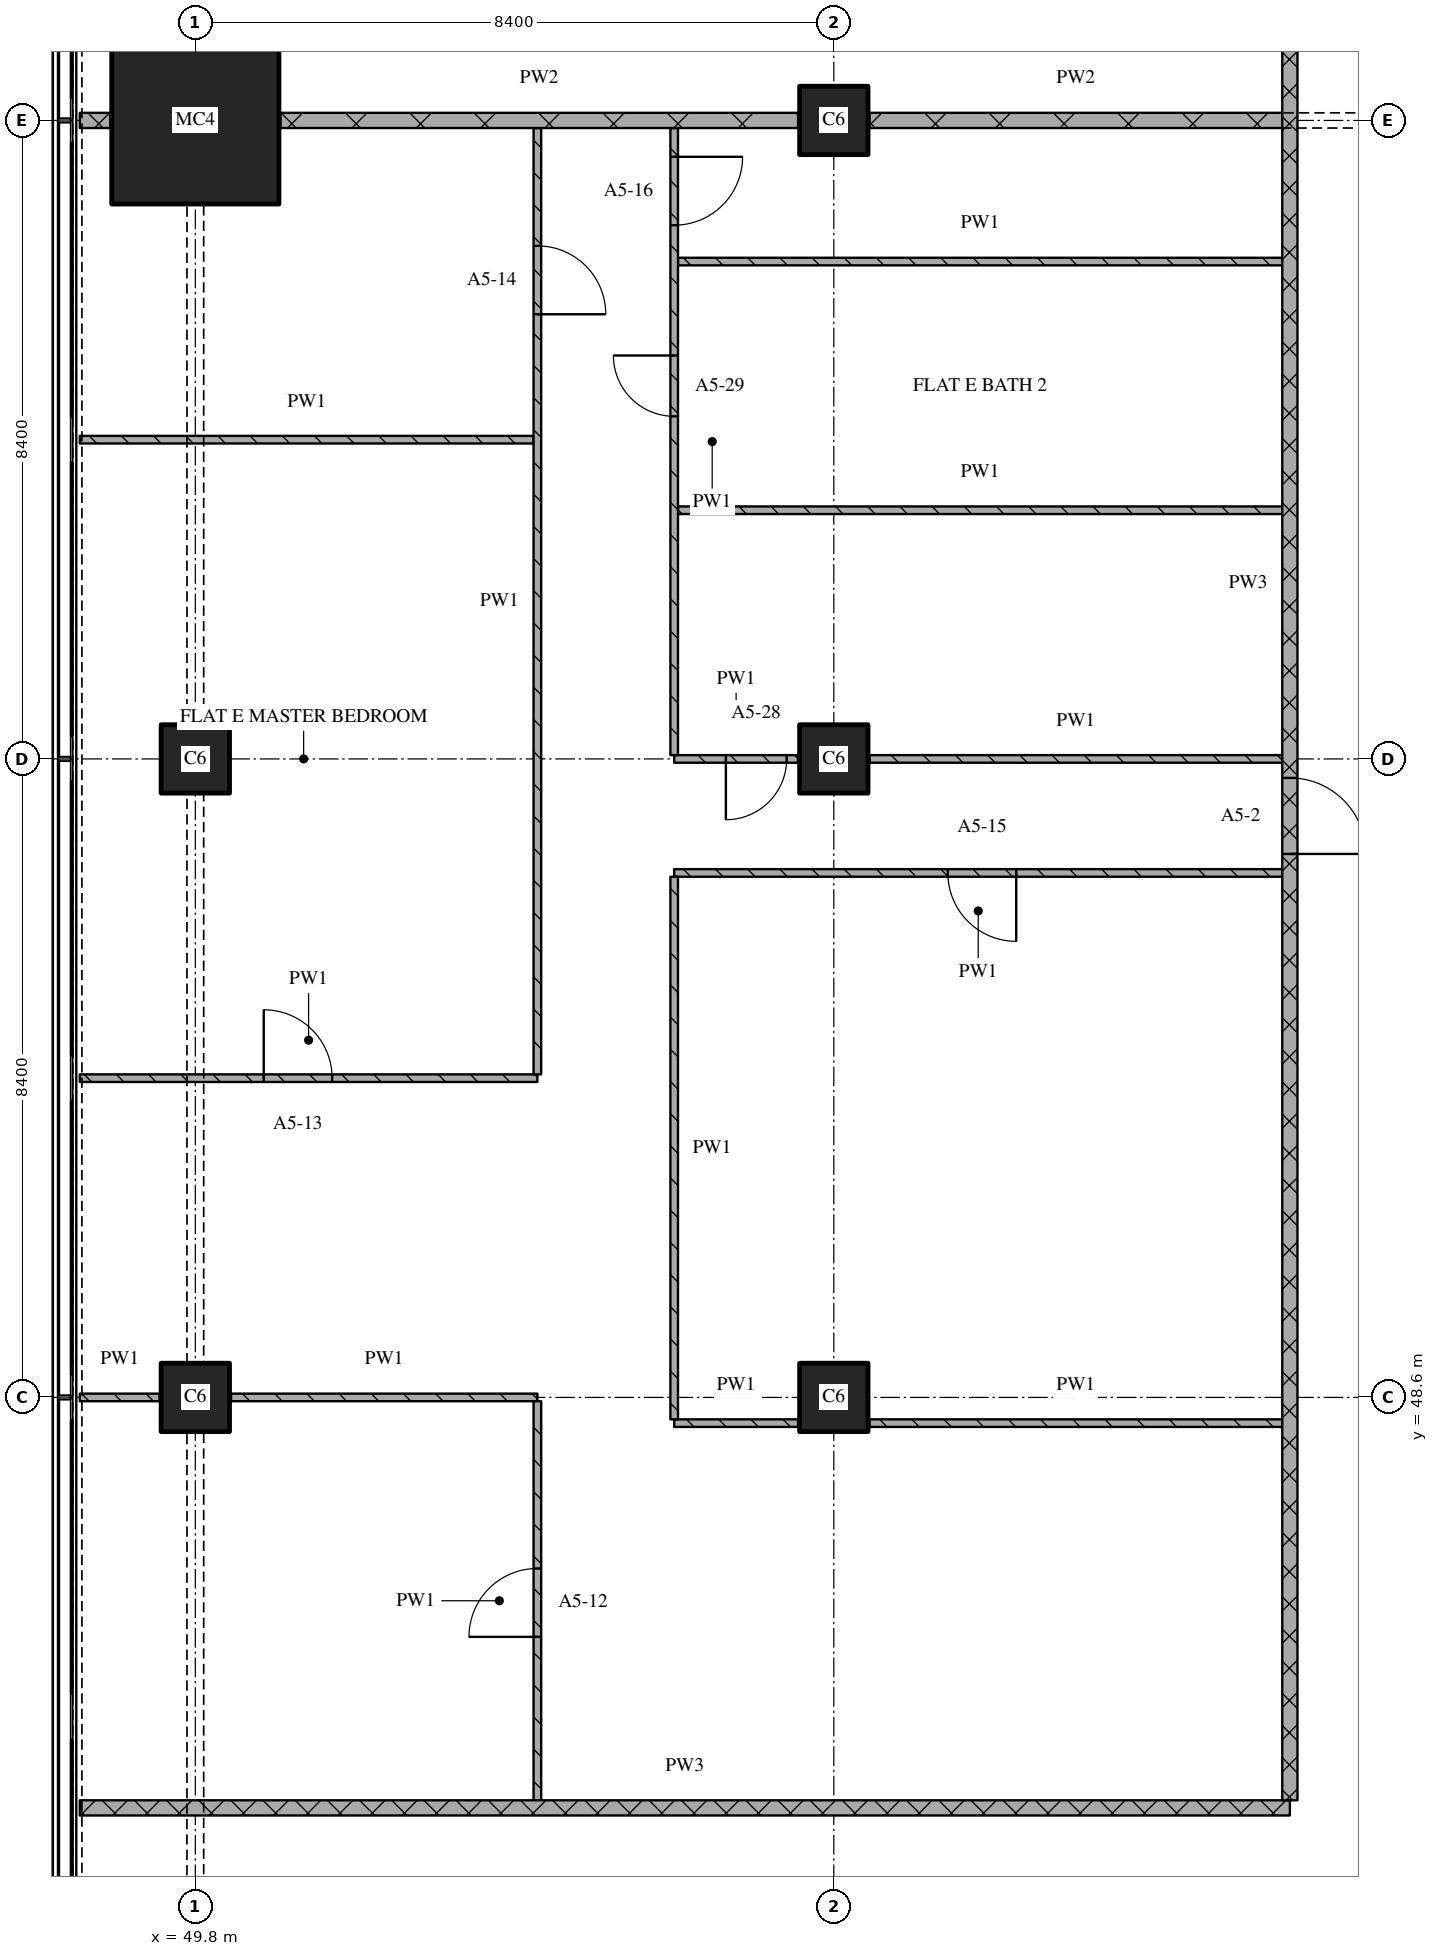
"""IFC4 building model, lengths in metres.
Left out: names, types, materials, properties, quantities, classifications, styles, units other than length and angle.
Written with IfcOpenShell. Run it as: python <this file> out.ifc"""

import sys

from ifc_helpers import new_model, si_unit, direction, frame, frame_2d, origin, origin_2d, place, context, subcontext, project, spatial, rectangle, extrude, element, fill, save


model = new_model("IFC4")
c1 = context("Model", 3, precision=1e-05, world=origin(), true_north=direction((0.0, 1.0)))
c2 = subcontext(c1, "Body", "Model", "MODEL_VIEW")
j1 = project(units=[si_unit("LENGTHUNIT", "METRE"), si_unit("PLANEANGLEUNIT", "RADIAN")], contexts=[c1])
p1 = place(None, origin())
s1 = spatial("IfcSite", under=j1, at=p1, CompositionType="ELEMENT")
p2 = place(p1, origin())
s2 = spatial("IfcBuilding", under=s1, at=p2, CompositionType="ELEMENT")
p3 = place(p2, frame((0.0, 0.0, 80.4)))
s3 = spatial("IfcBuildingStorey", under=s2, at=p3, CompositionType="ELEMENT", Elevation=80.4)
for number, where, z_axis, x_axis in (
    (1, (49.8, 48.6, 0.0), (0.0, 0.0, 1.0), (1.0, 0.0, 0.0)),
    (2, (49.8, 57.0, 0.0), (0.0, 0.0, 1.0), (1.0, 0.0, 0.0)),
):
    element("IfcColumn", number, at=place(p3, frame(where, z_axis=z_axis, x_axis=x_axis)), inside=s3, PredefinedType="COLUMN", context=c2, shape_type="SweptSolid", body=[
        extrude(rectangle(XDim=0.9, YDim=0.9, at=origin_2d()), origin(), (0.0, 0.0, 1.0), 3.6),
    ])
p4 = place(p3, frame((49.8, 65.4, 0.0), z_axis=(0.0, 0.0, 1.0), x_axis=(1.0, 0.0, 0.0)))
e3 = element("IfcColumn", 3, at=p4, inside=s3, PredefinedType="COLUMN", context=c2, shape_type="SweptSolid", body=[
    extrude(rectangle(XDim=2.2, YDim=2.2, at=origin_2d()), origin(), (0.0, 0.0, 1.0), 3.6),
])
for number, where, z_axis, x_axis in (
    (4, (58.2, 48.6, 0.0), (0.0, 0.0, 1.0), (1.0, 0.0, 0.0)),
    (5, (58.2, 57.0, 0.0), (0.0, 0.0, 1.0), (1.0, 0.0, 0.0)),
    (6, (58.2, 65.4, 0.0), (0.0, 0.0, 1.0), (1.0, 0.0, 0.0)),
):
    element("IfcColumn", number, at=place(p3, frame(where, z_axis=z_axis, x_axis=x_axis)), inside=s3, PredefinedType="COLUMN", context=c2, shape_type="SweptSolid", body=[
        extrude(rectangle(XDim=0.9, YDim=0.9, at=origin_2d()), origin(), (0.0, 0.0, 1.0), 3.6),
    ])
p5 = place(p3, frame((48.28, 43.2, 0.0), z_axis=(0.0, 0.0, 1.0), x_axis=(1.0, 0.0, 0.0)))
e7 = element("IfcWall", 7, at=p5, inside=s3, PredefinedType="PARTITIONING", context=c2, shape_type="SweptSolid", body=[
    extrude(rectangle(XDim=15.92, YDim=0.2, at=frame_2d((7.96, 0.0))), origin(), (0.0, 0.0, 1.0), 3.3),
])
p6 = place(p3, frame((56.1, 48.262, 0.0), z_axis=(0.0, 0.0, 1.0), x_axis=(1.0, 0.0, 0.0)))
e8 = element("IfcWall", 8, at=p6, inside=s3, PredefinedType="PARTITIONING", context=c2, shape_type="SweptSolid", body=[
    extrude(rectangle(XDim=1.63, YDim=0.1, at=frame_2d((0.815, 0.0))), origin(), (0.0, 0.0, 1.0), 3.3),
])
p7 = place(p3, frame((58.67, 48.262, 0.0), z_axis=(0.0, 0.0, 1.0), x_axis=(1.0, 0.0, 0.0)))
e9 = element("IfcWall", 9, at=p7, inside=s3, PredefinedType="PARTITIONING", context=c2, shape_type="SweptSolid", body=[
    extrude(rectangle(XDim=5.43, YDim=0.1, at=frame_2d((2.715, 0.0))), origin(), (0.0, 0.0, 1.0), 3.3),
])
p8 = place(p3, frame((48.28, 48.6, 0.0), z_axis=(0.0, 0.0, 1.0), x_axis=(1.0, 0.0, 0.0)))
e10 = element("IfcWall", 10, at=p8, inside=s3, PredefinedType="PARTITIONING", context=c2, shape_type="SweptSolid", body=[
    extrude(rectangle(XDim=1.05, YDim=0.1, at=frame_2d((0.525, 0.0))), origin(), (0.0, 0.0, 1.0), 3.3),
])
p9 = place(p3, frame((50.27, 48.6, 0.0), z_axis=(0.0, 0.0, 1.0), x_axis=(1.0, 0.0, 0.0)))
e11 = element("IfcWall", 11, at=p9, inside=s3, PredefinedType="PARTITIONING", context=c2, shape_type="SweptSolid", body=[
    extrude(rectangle(XDim=4.03, YDim=0.1, at=frame_2d((2.015, 0.0))), origin(), (0.0, 0.0, 1.0), 3.3),
])
p10 = place(p3, frame((48.28, 52.8, 0.0), z_axis=(0.0, 0.0, 1.0), x_axis=(1.0, 0.0, 0.0)))
e12 = element("IfcWall", 12, at=p10, inside=s3, PredefinedType="PARTITIONING", context=c2, shape_type="SweptSolid", body=[
    extrude(rectangle(XDim=6.02, YDim=0.1, at=frame_2d((3.01, 0.0))), origin(), (0.0, 0.0, 1.0), 3.3),
])
p11 = place(p10, frame((2.42, 0.0, 0.0)))
e13 = element("IfcOpeningElement", 13, at=p11, cuts=e12, PredefinedType="OPENING", context=c2, shape_type="SweptSolid", body=[
    extrude(rectangle(XDim=0.9, YDim=2.1, at=frame_2d((0.45, 1.05))), frame((0.0, 0.06, 0.0), z_axis=(0.0, -1.0, 0.0), x_axis=(1.0, 0.0, 0.0)), (0.0, 0.0, 1.0), 0.12),
])
p12 = place(p3, frame((64.1, 55.5, 0.0), z_axis=(0.0, 0.0, 1.0), x_axis=(-1.0, 0.0, 0.0)))
e14 = element("IfcWall", 14, at=p12, inside=s3, PredefinedType="PARTITIONING", context=c2, shape_type="SweptSolid", body=[
    extrude(rectangle(XDim=8.0, YDim=0.1, at=frame_2d((4.0, 0.0))), origin(), (0.0, 0.0, 1.0), 3.3),
])
p13 = place(p12, frame((3.5, 0.0, 0.0)))
e15 = element("IfcOpeningElement", 15, at=p13, cuts=e14, PredefinedType="OPENING", context=c2, shape_type="SweptSolid", body=[
    extrude(rectangle(XDim=0.9, YDim=2.1, at=frame_2d((0.45, 1.05))), frame((0.0, 0.06, 0.0), z_axis=(0.0, -1.0, 0.0), x_axis=(1.0, 0.0, 0.0)), (0.0, 0.0, 1.0), 0.12),
])
p14 = place(p3, frame((56.1, 57.0, 0.0), z_axis=(0.0, 0.0, 1.0), x_axis=(1.0, 0.0, 0.0)))
e16 = element("IfcWall", 16, at=p14, inside=s3, PredefinedType="PARTITIONING", context=c2, shape_type="SweptSolid", body=[
    extrude(rectangle(XDim=1.63, YDim=0.1, at=frame_2d((0.815, 0.0))), origin(), (0.0, 0.0, 1.0), 3.3),
])
p15 = place(p14, frame((0.68, 0.0, 0.0)))
e17 = element("IfcOpeningElement", 17, at=p15, cuts=e16, PredefinedType="OPENING", context=c2, shape_type="SweptSolid", body=[
    extrude(rectangle(XDim=0.8, YDim=2.1, at=frame_2d((0.4, 1.05))), frame((0.0, 0.06, 0.0), z_axis=(0.0, -1.0, 0.0), x_axis=(1.0, 0.0, 0.0)), (0.0, 0.0, 1.0), 0.12),
])
p16 = place(p3, frame((58.67, 57.0, 0.0), z_axis=(0.0, 0.0, 1.0), x_axis=(1.0, 0.0, 0.0)))
e18 = element("IfcWall", 18, at=p16, inside=s3, PredefinedType="PARTITIONING", context=c2, shape_type="SweptSolid", body=[
    extrude(rectangle(XDim=5.43, YDim=0.1, at=frame_2d((2.715, 0.0))), origin(), (0.0, 0.0, 1.0), 3.3),
])
p17 = place(p3, frame((56.15, 60.271, 0.0), z_axis=(0.0, 0.0, 1.0), x_axis=(1.0, 0.0, 0.0)))
e19 = element("IfcWall", 19, at=p17, inside=s3, PredefinedType="PARTITIONING", context=c2, shape_type="SweptSolid", body=[
    extrude(rectangle(XDim=7.95, YDim=0.1, at=frame_2d((3.975, 0.0))), origin(), (0.0, 0.0, 1.0), 3.3),
])
p18 = place(p3, frame((48.28, 61.2, 0.0), z_axis=(0.0, 0.0, 1.0), x_axis=(1.0, 0.0, 0.0)))
e20 = element("IfcWall", 20, at=p18, inside=s3, PredefinedType="PARTITIONING", context=c2, shape_type="SweptSolid", body=[
    extrude(rectangle(XDim=5.97, YDim=0.1, at=frame_2d((2.985, 0.0))), origin(), (0.0, 0.0, 1.0), 3.3),
])
p19 = place(p3, frame((56.15, 63.543, 0.0), z_axis=(0.0, 0.0, 1.0), x_axis=(1.0, 0.0, 0.0)))
e21 = element("IfcWall", 21, at=p19, inside=s3, PredefinedType="PARTITIONING", context=c2, shape_type="SweptSolid", body=[
    extrude(rectangle(XDim=7.95, YDim=0.1, at=frame_2d((3.975, 0.0))), origin(), (0.0, 0.0, 1.0), 3.3),
])
p20 = place(p3, frame((48.28, 65.4, 0.0), z_axis=(0.0, 0.0, 1.0), x_axis=(1.0, 0.0, 0.0)))
e22 = element("IfcWall", 22, at=p20, inside=s3, PredefinedType="PARTITIONING", context=c2, shape_type="SweptSolid", body=[
    extrude(rectangle(XDim=0.4, YDim=0.2, at=frame_2d((0.2, 0.0))), origin(), (0.0, 0.0, 1.0), 3.3),
])
p21 = place(p3, frame((50.92, 65.4, 0.0), z_axis=(0.0, 0.0, 1.0), x_axis=(1.0, 0.0, 0.0)))
e23 = element("IfcWall", 23, at=p21, inside=s3, PredefinedType="PARTITIONING", context=c2, shape_type="SweptSolid", body=[
    extrude(rectangle(XDim=6.81, YDim=0.2, at=frame_2d((3.405, 0.0))), origin(), (0.0, 0.0, 1.0), 2.41),
])
p22 = place(p3, frame((58.67, 65.4, 0.0), z_axis=(0.0, 0.0, 1.0), x_axis=(1.0, 0.0, 0.0)))
e24 = element("IfcWall", 24, at=p22, inside=s3, PredefinedType="PARTITIONING", context=c2, shape_type="SweptSolid", body=[
    extrude(rectangle(XDim=5.43, YDim=0.2, at=frame_2d((2.715, 0.0))), origin(), (0.0, 0.0, 1.0), 2.8),
])
p23 = place(p3, frame((54.3, 43.3, 0.0), z_axis=(0.0, 0.0, 1.0), x_axis=(0.0, 1.0, 0.0)))
e25 = element("IfcWall", 25, at=p23, inside=s3, PredefinedType="PARTITIONING", context=c2, shape_type="SweptSolid", body=[
    extrude(rectangle(XDim=5.25, YDim=0.1, at=frame_2d((2.625, 0.0))), origin(), (0.0, 0.0, 1.0), 3.3),
])
p24 = place(p23, frame((2.15, 0.0, 0.0)))
e26 = element("IfcOpeningElement", 26, at=p24, cuts=e25, PredefinedType="OPENING", context=c2, shape_type="SweptSolid", body=[
    extrude(rectangle(XDim=0.9, YDim=2.1, at=frame_2d((0.45, 1.05))), frame((0.0, 0.06, 0.0), z_axis=(0.0, -1.0, 0.0), x_axis=(1.0, 0.0, 0.0)), (0.0, 0.0, 1.0), 0.12),
])
p25 = place(p3, frame((54.3, 52.85, 0.0), z_axis=(0.0, 0.0, 1.0), x_axis=(0.0, 1.0, 0.0)))
e27 = element("IfcWall", 27, at=p25, inside=s3, PredefinedType="PARTITIONING", context=c2, shape_type="SweptSolid", body=[
    extrude(rectangle(XDim=12.45, YDim=0.1, at=frame_2d((6.225, 0.0))), origin(), (0.0, 0.0, 1.0), 3.3),
])
p26 = place(p25, frame((10.0, 0.0, 0.0)))
e28 = element("IfcOpeningElement", 28, at=p26, cuts=e27, PredefinedType="OPENING", context=c2, shape_type="SweptSolid", body=[
    extrude(rectangle(XDim=0.9, YDim=2.1, at=frame_2d((0.45, 1.05))), frame((0.0, 0.06, 0.0), z_axis=(0.0, -1.0, 0.0), x_axis=(1.0, 0.0, 0.0)), (0.0, 0.0, 1.0), 0.12),
])
p27 = place(p3, frame((56.1, 55.45, 0.0), z_axis=(0.0, 0.0, 1.0), x_axis=(0.0, -1.0, 0.0)))
e29 = element("IfcWall", 29, at=p27, inside=s3, PredefinedType="PARTITIONING", context=c2, shape_type="SweptSolid", body=[
    extrude(rectangle(XDim=7.138, YDim=0.1, at=frame_2d((3.569, 0.0))), origin(), (0.0, 0.0, 1.0), 3.3),
])
p28 = place(p3, frame((56.1, 65.3, 0.0), z_axis=(0.0, 0.0, 1.0), x_axis=(0.0, -1.0, 0.0)))
e30 = element("IfcWall", 30, at=p28, inside=s3, PredefinedType="PARTITIONING", context=c2, shape_type="SweptSolid", body=[
    extrude(rectangle(XDim=8.25, YDim=0.1, at=frame_2d((4.125, 0.0))), origin(), (0.0, 0.0, 1.0), 3.3),
])
p29 = place(p28, frame((0.378, 0.0, 0.0)))
e31 = element("IfcOpeningElement", 31, at=p29, cuts=e30, PredefinedType="OPENING", context=c2, shape_type="SweptSolid", body=[
    extrude(rectangle(XDim=0.9, YDim=2.1, at=frame_2d((0.45, 1.05))), frame((0.0, 0.06, 0.0), z_axis=(0.0, -1.0, 0.0), x_axis=(1.0, 0.0, 0.0)), (0.0, 0.0, 1.0), 0.12),
])
p30 = place(p28, frame((2.993, 0.0, 0.0)))
e32 = element("IfcOpeningElement", 32, at=p30, cuts=e30, PredefinedType="OPENING", context=c2, shape_type="SweptSolid", body=[
    extrude(rectangle(XDim=0.8, YDim=2.1, at=frame_2d((0.4, 1.05))), frame((0.0, 0.06, 0.0), z_axis=(0.0, -1.0, 0.0), x_axis=(1.0, 0.0, 0.0)), (0.0, 0.0, 1.0), 0.12),
])
p31 = place(p3, frame((64.2, 43.3, 0.0), z_axis=(0.0, 0.0, 1.0), x_axis=(0.0, 1.0, 0.0)))
e33 = element("IfcWall", 33, at=p31, inside=s3, PredefinedType="PARTITIONING", context=c2, shape_type="SweptSolid", body=[
    extrude(rectangle(XDim=32.02, YDim=0.2, at=frame_2d((16.01, 0.0))), origin(), (0.0, 0.0, 1.0), 3.3),
])
p32 = place(p31, frame((12.45, 0.0, 0.0)))
e34 = element("IfcOpeningElement", 34, at=p32, cuts=e33, PredefinedType="OPENING", context=c2, shape_type="SweptSolid", body=[
    extrude(rectangle(XDim=1.0, YDim=2.1, at=frame_2d((0.5, 1.05))), frame((0.0, 0.11, 0.0), z_axis=(0.0, -1.0, 0.0), x_axis=(1.0, 0.0, 0.0)), (0.0, 0.0, 1.0), 0.22),
])
p33 = place(p31, frame((26.85, 0.0, 0.0)))
e35 = element("IfcOpeningElement", 35, at=p33, cuts=e33, PredefinedType="OPENING", context=c2, shape_type="SweptSolid", body=[
    extrude(rectangle(XDim=1.0, YDim=2.1, at=frame_2d((0.5, 1.05))), frame((0.0, 0.11, 0.0), z_axis=(0.0, -1.0, 0.0), x_axis=(1.0, 0.0, 0.0)), (0.0, 0.0, 1.0), 0.22),
])
p34 = place(p11, origin())
e36 = element("IfcDoor", 36, at=p34, inside=s3, OperationType="SINGLE_SWING_LEFT", PredefinedType="DOOR", context=c2, shape_type="SweptSolid", body=[
    extrude(rectangle(XDim=0.9, YDim=2.1, at=frame_2d((0.45, 1.05))), frame((0.0, 0.025, 0.0), z_axis=(0.0, -1.0, 0.0), x_axis=(1.0, 0.0, 0.0)), (0.0, 0.0, 1.0), 0.05),
])
fill(e13, e36)
p35 = place(p13, origin())
e37 = element("IfcDoor", 37, at=p35, inside=s3, OperationType="SINGLE_SWING_LEFT", PredefinedType="DOOR", context=c2, shape_type="SweptSolid", body=[
    extrude(rectangle(XDim=0.9, YDim=2.1, at=frame_2d((0.45, 1.05))), frame((0.0, 0.025, 0.0), z_axis=(0.0, -1.0, 0.0), x_axis=(1.0, 0.0, 0.0)), (0.0, 0.0, 1.0), 0.05),
])
fill(e15, e37)
p36 = place(p15, origin())
e38 = element("IfcDoor", 38, at=p36, inside=s3, OperationType="SINGLE_SWING_RIGHT", PredefinedType="DOOR", context=c2, shape_type="SweptSolid", body=[
    extrude(rectangle(XDim=0.8, YDim=2.1, at=frame_2d((0.4, 1.05))), frame((0.0, 0.025, 0.0), z_axis=(0.0, -1.0, 0.0), x_axis=(1.0, 0.0, 0.0)), (0.0, 0.0, 1.0), 0.05),
])
fill(e17, e38)
p37 = place(p24, origin())
e39 = element("IfcDoor", 39, at=p37, inside=s3, OperationType="SINGLE_SWING_LEFT", PredefinedType="DOOR", context=c2, shape_type="SweptSolid", body=[
    extrude(rectangle(XDim=0.9, YDim=2.1, at=frame_2d((0.45, 1.05))), frame((0.0, 0.025, 0.0), z_axis=(0.0, -1.0, 0.0), x_axis=(1.0, 0.0, 0.0)), (0.0, 0.0, 1.0), 0.05),
])
fill(e26, e39)
p38 = place(p26, origin())
e40 = element("IfcDoor", 40, at=p38, inside=s3, OperationType="SINGLE_SWING_RIGHT", PredefinedType="DOOR", context=c2, shape_type="SweptSolid", body=[
    extrude(rectangle(XDim=0.9, YDim=2.1, at=frame_2d((0.45, 1.05))), frame((0.0, 0.025, 0.0), z_axis=(0.0, -1.0, 0.0), x_axis=(1.0, 0.0, 0.0)), (0.0, 0.0, 1.0), 0.05),
])
fill(e28, e40)
p39 = place(p29, origin())
e41 = element("IfcDoor", 41, at=p39, inside=s3, OperationType="SINGLE_SWING_LEFT", PredefinedType="DOOR", context=c2, shape_type="SweptSolid", body=[
    extrude(rectangle(XDim=0.9, YDim=2.1, at=frame_2d((0.45, 1.05))), frame((0.0, 0.025, 0.0), z_axis=(0.0, -1.0, 0.0), x_axis=(1.0, 0.0, 0.0)), (0.0, 0.0, 1.0), 0.05),
])
fill(e31, e41)
p40 = place(p30, origin())
e42 = element("IfcDoor", 42, at=p40, inside=s3, OperationType="SINGLE_SWING_RIGHT", PredefinedType="DOOR", context=c2, shape_type="SweptSolid", body=[
    extrude(rectangle(XDim=0.8, YDim=2.1, at=frame_2d((0.4, 1.05))), frame((0.0, 0.025, 0.0), z_axis=(0.0, -1.0, 0.0), x_axis=(1.0, 0.0, 0.0)), (0.0, 0.0, 1.0), 0.05),
])
fill(e32, e42)
p41 = place(p32, origin())
e43 = element("IfcDoor", 43, at=p41, inside=s3, OperationType="SINGLE_SWING_RIGHT", PredefinedType="DOOR", context=c2, shape_type="SweptSolid", body=[
    extrude(rectangle(XDim=1.0, YDim=2.1, at=frame_2d((0.5, 1.05))), frame((0.0, 0.025, 0.0), z_axis=(0.0, -1.0, 0.0), x_axis=(1.0, 0.0, 0.0)), (0.0, 0.0, 1.0), 0.05),
])
fill(e34, e43)
save(model, sys.argv[1])
